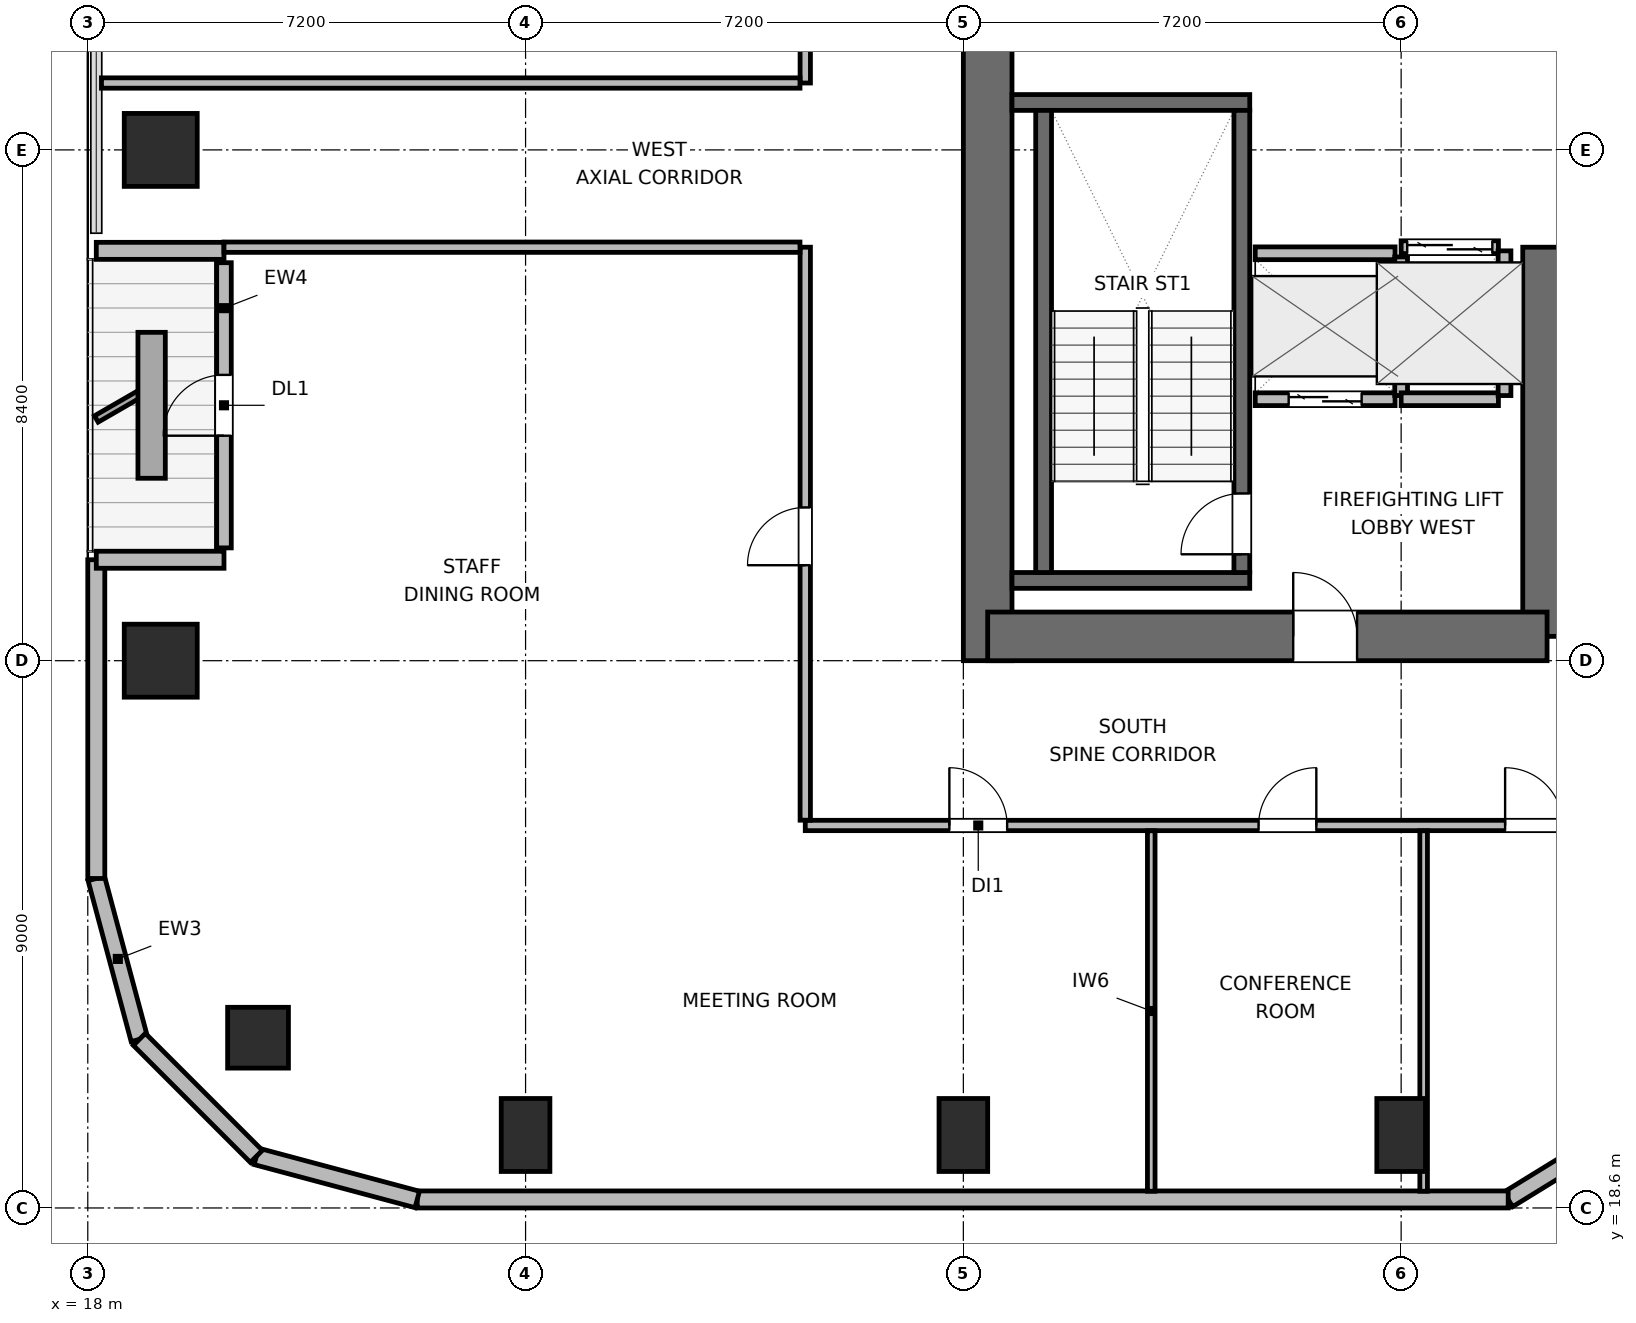
"""IFC4 building model, lengths in metres.
Left out: names, types, materials, properties, quantities, classifications, styles, units other than length and angle.
Written with IfcOpenShell. Run it as: python <this file> out.ifc"""

import sys

from ifc_helpers import new_model, si_unit, direction, frame, frame_2d, origin, origin_2d, place, context, subcontext, project, spatial, rectangle, circle, extrude, element, fill, save


model = new_model("IFC4")
c1 = context("Model", 3, precision=1e-05, world=origin(), true_north=direction((0.0, 1.0)))
c2 = subcontext(c1, "Body", "Model", "MODEL_VIEW")
j1 = project(units=[si_unit("LENGTHUNIT", "METRE"), si_unit("PLANEANGLEUNIT", "RADIAN")], contexts=[c1])
p1 = place(None, origin())
s1 = spatial("IfcSite", under=j1, at=p1, CompositionType="ELEMENT")
p2 = place(p1, origin())
s2 = spatial("IfcBuilding", under=s1, at=p2, CompositionType="ELEMENT")
p3 = place(p2, frame((0.0, 0.0, 166.2)))
s3 = spatial("IfcBuildingStorey", under=s2, at=p3, CompositionType="ELEMENT", Elevation=166.2)
p4 = place(p3, frame((32.8, 27.6, 0.0), z_axis=(0.0, 0.0, 1.0), x_axis=(0.0, 1.0, 0.0)))
e1 = element("IfcWall", 1, at=p4, inside=s3, PredefinedType="SHEAR", context=c2, shape_type="SweptSolid", body=[
    extrude(rectangle(XDim=16.8, YDim=0.8, at=frame_2d((8.4, 0.0))), origin(), (0.0, 0.0, 1.0), 3.9),
])
p5 = place(p3, frame((42.0, 28.0, 0.0), z_axis=(0.0, 0.0, 1.0), x_axis=(0.0, 1.0, 0.0)))
e2 = element("IfcWall", 2, at=p5, inside=s3, PredefinedType="SHEAR", context=c2, shape_type="SweptSolid", body=[
    extrude(rectangle(XDim=6.4, YDim=0.8, at=frame_2d((3.2, 0.0))), origin(), (0.0, 0.0, 1.0), 3.9),
])
p6 = place(p3, frame((32.8, 28.0, 0.0), z_axis=(0.0, 0.0, 1.0), x_axis=(1.0, 0.0, 0.0)))
e3 = element("IfcWall", 3, at=p6, inside=s3, PredefinedType="SHEAR", context=c2, shape_type="SweptSolid", body=[
    extrude(rectangle(XDim=9.2, YDim=0.8, at=frame_2d((4.6, 0.0))), origin(), (0.0, 0.0, 1.0), 3.9),
])
p7 = place(p6, frame((5.025, 0.0, 0.0)))
e4 = element("IfcOpeningElement", 4, at=p7, cuts=e3, PredefinedType="OPENING", context=c2, shape_type="SweptSolid", body=[
    extrude(rectangle(XDim=1.05, YDim=2.04, at=frame_2d((0.525, 1.02))), frame((0.0, 0.41, 0.0), z_axis=(0.0, -1.0, 0.0), x_axis=(1.0, 0.0, 0.0)), (0.0, 0.0, 1.0), 0.82),
])
for number, where, z_axis, x_axis in (
    (5, (33.2, 28.92, 0.0), (0.0, 0.0, 1.0), (1.0, 0.0, 0.0)),
    (6, (33.2, 36.78, 0.0), (0.0, 0.0, 1.0), (1.0, 0.0, 0.0)),
):
    element("IfcWall", number, at=place(p3, frame(where, z_axis=z_axis, x_axis=x_axis)), inside=s3, PredefinedType="SHEAR", context=c2, shape_type="SweptSolid", body=[
        extrude(rectangle(XDim=3.91, YDim=0.26, at=frame_2d((1.955, 0.0))), origin(), (0.0, 0.0, 1.0), 3.9),
    ])
p8 = place(p3, frame((33.72, 29.05, 0.0), z_axis=(0.0, 0.0, 1.0), x_axis=(0.0, 1.0, 0.0)))
e7 = element("IfcWall", 7, at=p8, inside=s3, PredefinedType="SHEAR", context=c2, shape_type="SweptSolid", body=[
    extrude(rectangle(XDim=7.6, YDim=0.26, at=frame_2d((3.8, 0.0))), origin(), (0.0, 0.0, 1.0), 3.9),
])
p9 = place(p3, frame((36.98, 29.05, 0.0), z_axis=(0.0, 0.0, 1.0), x_axis=(0.0, 1.0, 0.0)))
e8 = element("IfcWall", 8, at=p9, inside=s3, PredefinedType="SHEAR", context=c2, shape_type="SweptSolid", body=[
    extrude(rectangle(XDim=7.6, YDim=0.26, at=frame_2d((3.8, 0.0))), origin(), (0.0, 0.0, 1.0), 3.9),
])
p10 = place(p9, frame((0.3, 0.0, 0.0)))
e9 = element("IfcOpeningElement", 9, at=p10, cuts=e8, PredefinedType="OPENING", context=c2, shape_type="SweptSolid", body=[
    extrude(rectangle(XDim=1.0, YDim=2.04, at=frame_2d((0.5, 1.02))), frame((0.0, 0.14, 0.0), z_axis=(0.0, -1.0, 0.0), x_axis=(1.0, 0.0, 0.0)), (0.0, 0.0, 1.0), 0.28),
])
p11 = place(p3, frame((20.8, 21.4, 0.0), z_axis=(0.0, 0.0, 1.0), x_axis=(1.0, 0.0, 0.0)))
e10 = element("IfcColumn", 10, at=p11, inside=s3, PredefinedType="COLUMN", context=c2, shape_type="SweptSolid", body=[
    extrude(circle(Radius=0.5, at=origin_2d()), origin(), (0.0, 0.0, 1.0), 3.9),
])
for number, where, z_axis, x_axis in (
    (11, (25.2, 19.8, 0.0), (0.0, 0.0, 1.0), (1.0, 0.0, 0.0)),
    (12, (32.4, 19.8, 0.0), (0.0, 0.0, 1.0), (1.0, 0.0, 0.0)),
    (13, (39.6, 19.8, 0.0), (0.0, 0.0, 1.0), (1.0, 0.0, 0.0)),
):
    element("IfcColumn", number, at=place(p3, frame(where, z_axis=z_axis, x_axis=x_axis)), inside=s3, PredefinedType="COLUMN", context=c2, shape_type="SweptSolid", body=[
        extrude(rectangle(XDim=0.8, YDim=1.2, at=origin_2d()), origin(), (0.0, 0.0, 1.0), 3.9),
    ])
for number, where, z_axis, x_axis in (
    (14, (19.2, 27.6, 0.0), (0.0, 0.0, 1.0), (1.0, 0.0, 0.0)),
    (15, (19.2, 36.0, 0.0), (0.0, 0.0, 1.0), (1.0, 0.0, 0.0)),
):
    element("IfcColumn", number, at=place(p3, frame(where, z_axis=z_axis, x_axis=x_axis)), inside=s3, PredefinedType="COLUMN", context=c2, shape_type="SweptSolid", body=[
        extrude(rectangle(XDim=1.2, YDim=1.2, at=origin_2d()), origin(), (0.0, 0.0, 1.0), 3.9),
    ])
p12 = place(p3, frame((18.848, 21.373, 0.0), z_axis=(0.0, 0.0, 1.0), x_axis=(-0.258672222976, 0.9659651552, 0.0)))
e16 = element("IfcWall", 16, at=p12, inside=s3, PredefinedType="SOLIDWALL", context=c2, shape_type="SweptSolid", body=[
    extrude(rectangle(XDim=2.739, YDim=0.28, at=frame_2d((1.37, 0.0))), origin(), (0.0, 0.0, 1.0), 3.68),
])
p13 = place(p3, frame((18.14, 24.018, 0.0), z_axis=(0.0, 0.0, 1.0), x_axis=(0.0, 1.0, 0.0)))
e17 = element("IfcWall", 17, at=p13, inside=s3, PredefinedType="SOLIDWALL", context=c2, shape_type="SweptSolid", body=[
    extrude(rectangle(XDim=5.242, YDim=0.28, at=frame_2d((2.621, 0.0))), origin(), (0.0, 0.0, 1.0), 3.68),
])
p14 = place(p3, frame((18.14, 29.26, 0.0), z_axis=(0.0, 0.0, 1.0), x_axis=(1.0, 0.0, 0.0)))
e18 = element("IfcWall", 18, at=p14, inside=s3, PredefinedType="SOLIDWALL", context=c2, shape_type="SweptSolid", body=[
    extrude(rectangle(XDim=2.1, YDim=0.28, at=frame_2d((1.05, 0.0))), origin(), (0.0, 0.0, 1.0), 3.116),
])
p15 = place(p3, frame((20.24, 29.455, 0.0), z_axis=(0.0, 0.0, 1.0), x_axis=(0.0, 1.0, 0.0)))
e19 = element("IfcWall", 19, at=p15, inside=s3, PredefinedType="SOLIDWALL", context=c2, shape_type="SweptSolid", body=[
    extrude(rectangle(XDim=4.69, YDim=0.24, at=frame_2d((2.345, 0.0))), origin(), (0.0, 0.0, 1.0), 3.248),
])
p16 = place(p15, frame((1.845, 0.0, 0.0)))
e20 = element("IfcOpeningElement", 20, at=p16, cuts=e19, PredefinedType="OPENING", context=c2, shape_type="SweptSolid", body=[
    extrude(rectangle(XDim=1.0, YDim=2.02, at=frame_2d((0.5, 1.01))), frame((0.0, 0.13, 0.0), z_axis=(0.0, -1.0, 0.0), x_axis=(1.0, 0.0, 0.0)), (0.0, 0.0, 1.0), 0.26),
])
p17 = place(p3, frame((20.24, 34.34, 0.0), z_axis=(0.0, 0.0, 1.0), x_axis=(-1.0, 0.0, 0.0)))
e21 = element("IfcWall", 21, at=p17, inside=s3, PredefinedType="SOLIDWALL", context=c2, shape_type="SweptSolid", body=[
    extrude(rectangle(XDim=2.1, YDim=0.28, at=frame_2d((1.05, 0.0))), origin(), (0.0, 0.0, 1.0), 3.116),
])
p18 = place(p3, frame((42.46, 19.416, 0.0), z_axis=(0.0, 0.0, 1.0), x_axis=(-0.851801140441, -0.523865266212, 0.0)))
e22 = element("IfcWall", 22, at=p18, inside=s3, PredefinedType="SOLIDWALL", context=c2, shape_type="SweptSolid", body=[
    extrude(rectangle(XDim=1.291, YDim=0.28, at=frame_2d((0.646, 0.0))), origin(), (0.0, 0.0, 1.0), 3.68),
])
p19 = place(p3, frame((41.36, 18.74, 0.0), z_axis=(0.0, 0.0, 1.0), x_axis=(-1.0, 0.0, 0.0)))
e23 = element("IfcWall", 23, at=p19, inside=s3, PredefinedType="SOLIDWALL", context=c2, shape_type="SweptSolid", body=[
    extrude(rectangle(XDim=17.942, YDim=0.28, at=frame_2d((8.971, 0.0))), origin(), (0.0, 0.0, 1.0), 3.68),
])
p20 = place(p3, frame((23.418, 18.74, 0.0), z_axis=(0.0, 0.0, 1.0), x_axis=(-0.965971118627, 0.258649952598, 0.0)))
e24 = element("IfcWall", 24, at=p20, inside=s3, PredefinedType="SOLIDWALL", context=c2, shape_type="SweptSolid", body=[
    extrude(rectangle(XDim=2.739, YDim=0.28, at=frame_2d((1.37, 0.0))), origin(), (0.0, 0.0, 1.0), 3.68),
])
p21 = place(p3, frame((20.772, 19.448, 0.0), z_axis=(0.0, 0.0, 1.0), x_axis=(-0.707106781187, 0.707106781187, 0.0)))
e25 = element("IfcWall", 25, at=p21, inside=s3, PredefinedType="SOLIDWALL", context=c2, shape_type="SweptSolid", body=[
    extrude(rectangle(XDim=2.721, YDim=0.28, at=frame_2d((1.36, 0.0))), origin(), (0.0, 0.0, 1.0), 3.68),
])
p22 = place(p3, frame((37.2, 31.9, 0.0), z_axis=(0.0, 0.0, 1.0), x_axis=(1.0, 0.0, 0.0)))
e26 = element("IfcWall", 26, at=p22, inside=s3, PredefinedType="PARTITIONING", context=c2, shape_type="SweptSolid", body=[
    extrude(rectangle(XDim=2.3, YDim=0.21, at=frame_2d((1.15, 0.0))), origin(), (0.0, 0.0, 1.0), 3.68),
])
p23 = place(p22, frame((0.55, 0.0, 0.0)))
e27 = element("IfcOpeningElement", 27, at=p23, cuts=e26, PredefinedType="OPENING", context=c2, shape_type="SweptSolid", body=[
    extrude(rectangle(XDim=1.2, YDim=2.04, at=frame_2d((0.6, 1.02))), frame((0.0, 0.115, 0.0), z_axis=(0.0, -1.0, 0.0), x_axis=(1.0, 0.0, 0.0)), (0.0, 0.0, 1.0), 0.23),
])
p24 = place(p3, frame((37.2, 34.3, 0.0), z_axis=(0.0, 0.0, 1.0), x_axis=(1.0, 0.0, 0.0)))
e28 = element("IfcWall", 28, at=p24, inside=s3, PredefinedType="PARTITIONING", context=c2, shape_type="SweptSolid", body=[
    extrude(rectangle(XDim=2.3, YDim=0.21, at=frame_2d((1.15, 0.0))), origin(), (0.0, 0.0, 1.0), 3.68),
])
p25 = place(p3, frame((39.6, 31.96, 0.0), z_axis=(0.0, 0.0, 1.0), x_axis=(0.0, 1.0, 0.0)))
e29 = element("IfcWall", 29, at=p25, inside=s3, PredefinedType="PARTITIONING", context=c2, shape_type="SweptSolid", body=[
    extrude(rectangle(XDim=2.28, YDim=0.21, at=frame_2d((1.14, 0.0))), origin(), (0.0, 0.0, 1.0), 3.68),
])
p26 = place(p3, frame((39.6, 34.4, 0.0), z_axis=(0.0, 0.0, 1.0), x_axis=(1.0, 0.0, 0.0)))
e30 = element("IfcWall", 30, at=p26, inside=s3, PredefinedType="PARTITIONING", context=c2, shape_type="SweptSolid", body=[
    extrude(rectangle(XDim=1.6, YDim=0.21, at=frame_2d((0.8, 0.0))), origin(), (0.0, 0.0, 1.0), 3.68),
])
p27 = place(p26, frame((0.1, 0.0, 0.0)))
e31 = element("IfcOpeningElement", 31, at=p27, cuts=e30, PredefinedType="OPENING", context=c2, shape_type="SweptSolid", body=[
    extrude(rectangle(XDim=1.4, YDim=2.06, at=frame_2d((0.7, 1.03))), frame((0.0, 0.115, 0.0), z_axis=(0.0, -1.0, 0.0), x_axis=(1.0, 0.0, 0.0)), (0.0, 0.0, 1.0), 0.23),
])
p28 = place(p3, frame((39.6, 31.9, 0.0), z_axis=(0.0, 0.0, 1.0), x_axis=(1.0, 0.0, 0.0)))
e32 = element("IfcWall", 32, at=p28, inside=s3, PredefinedType="PARTITIONING", context=c2, shape_type="SweptSolid", body=[
    extrude(rectangle(XDim=1.6, YDim=0.21, at=frame_2d((0.8, 0.0))), origin(), (0.0, 0.0, 1.0), 3.68),
])
p29 = place(p3, frame((41.3, 31.96, 0.0), z_axis=(0.0, 0.0, 1.0), x_axis=(0.0, 1.0, 0.0)))
e33 = element("IfcWall", 33, at=p29, inside=s3, PredefinedType="PARTITIONING", context=c2, shape_type="SweptSolid", body=[
    extrude(rectangle(XDim=2.38, YDim=0.21, at=frame_2d((1.19, 0.0))), origin(), (0.0, 0.0, 1.0), 3.68),
])
p30 = place(p3, frame((29.8, 24.89, 0.0), z_axis=(0.0, 0.0, 1.0), x_axis=(1.0, 0.0, 0.0)))
e34 = element("IfcWall", 34, at=p30, inside=s3, PredefinedType="PARTITIONING", context=c2, shape_type="SweptSolid", body=[
    extrude(rectangle(XDim=33.8, YDim=0.17, at=frame_2d((16.9, 0.0))), origin(), (0.0, 0.0, 1.0), 3.68),
])
p31 = place(p30, frame((2.37, 0.0, 0.0)))
e35 = element("IfcOpeningElement", 35, at=p31, cuts=e34, PredefinedType="OPENING", context=c2, shape_type="SweptSolid", body=[
    extrude(rectangle(XDim=0.95, YDim=2.04, at=frame_2d((0.475, 1.02))), frame((0.0, 0.095, 0.0), z_axis=(0.0, -1.0, 0.0), x_axis=(1.0, 0.0, 0.0)), (0.0, 0.0, 1.0), 0.19),
])
p32 = place(p30, frame((7.455, 0.0, 0.0)))
e36 = element("IfcOpeningElement", 36, at=p32, cuts=e34, PredefinedType="OPENING", context=c2, shape_type="SweptSolid", body=[
    extrude(rectangle(XDim=0.95, YDim=2.04, at=frame_2d((0.475, 1.02))), frame((0.0, 0.095, 0.0), z_axis=(0.0, -1.0, 0.0), x_axis=(1.0, 0.0, 0.0)), (0.0, 0.0, 1.0), 0.19),
])
p33 = place(p30, frame((11.51, 0.0, 0.0)))
e37 = element("IfcOpeningElement", 37, at=p33, cuts=e34, PredefinedType="OPENING", context=c2, shape_type="SweptSolid", body=[
    extrude(rectangle(XDim=0.95, YDim=2.04, at=frame_2d((0.475, 1.02))), frame((0.0, 0.095, 0.0), z_axis=(0.0, -1.0, 0.0), x_axis=(1.0, 0.0, 0.0)), (0.0, 0.0, 1.0), 0.19),
])
p34 = place(p30, frame((15.995, 0.0, 0.0)))
e38 = element("IfcOpeningElement", 38, at=p34, cuts=e34, PredefinedType="OPENING", context=c2, shape_type="SweptSolid", body=[
    extrude(rectangle(XDim=0.95, YDim=2.04, at=frame_2d((0.475, 1.02))), frame((0.0, 0.095, 0.0), z_axis=(0.0, -1.0, 0.0), x_axis=(1.0, 0.0, 0.0)), (0.0, 0.0, 1.0), 0.19),
])
p35 = place(p30, frame((20.91, 0.0, 0.0)))
e39 = element("IfcOpeningElement", 39, at=p35, cuts=e34, PredefinedType="OPENING", context=c2, shape_type="SweptSolid", body=[
    extrude(rectangle(XDim=0.95, YDim=2.04, at=frame_2d((0.475, 1.02))), frame((0.0, 0.095, 0.0), z_axis=(0.0, -1.0, 0.0), x_axis=(1.0, 0.0, 0.0)), (0.0, 0.0, 1.0), 0.19),
])
p36 = place(p30, frame((25.395, 0.0, 0.0)))
e40 = element("IfcOpeningElement", 40, at=p36, cuts=e34, PredefinedType="OPENING", context=c2, shape_type="SweptSolid", body=[
    extrude(rectangle(XDim=0.95, YDim=2.04, at=frame_2d((0.475, 1.02))), frame((0.0, 0.095, 0.0), z_axis=(0.0, -1.0, 0.0), x_axis=(1.0, 0.0, 0.0)), (0.0, 0.0, 1.0), 0.19),
])
p37 = place(p30, frame((30.48, 0.0, 0.0)))
e41 = element("IfcOpeningElement", 41, at=p37, cuts=e34, PredefinedType="OPENING", context=c2, shape_type="SweptSolid", body=[
    extrude(rectangle(XDim=0.95, YDim=2.04, at=frame_2d((0.475, 1.02))), frame((0.0, 0.095, 0.0), z_axis=(0.0, -1.0, 0.0), x_axis=(1.0, 0.0, 0.0)), (0.0, 0.0, 1.0), 0.19),
])
p38 = place(p3, frame((29.8, 24.977, 0.0), z_axis=(0.0, 0.0, 1.0), x_axis=(0.0, 1.0, 0.0)))
e42 = element("IfcWall", 42, at=p38, inside=s3, PredefinedType="PARTITIONING", context=c2, shape_type="SweptSolid", body=[
    extrude(rectangle(XDim=9.423, YDim=0.17, at=frame_2d((4.711, 0.0))), origin(), (0.0, 0.0, 1.0), 3.68),
])
p39 = place(p38, frame((4.193, 0.0, 0.0)))
e43 = element("IfcOpeningElement", 43, at=p39, cuts=e42, PredefinedType="OPENING", context=c2, shape_type="SweptSolid", body=[
    extrude(rectangle(XDim=0.95, YDim=2.04, at=frame_2d((0.475, 1.02))), frame((0.0, 0.095, 0.0), z_axis=(0.0, -1.0, 0.0), x_axis=(1.0, 0.0, 0.0)), (0.0, 0.0, 1.0), 0.19),
])
p40 = place(p3, frame((29.8, 37.1, 0.0), z_axis=(0.0, 0.0, 1.0), x_axis=(0.0, 1.0, 0.0)))
e44 = element("IfcWall", 44, at=p40, inside=s3, PredefinedType="PARTITIONING", context=c2, shape_type="SweptSolid", body=[
    extrude(rectangle(XDim=9.923, YDim=0.17, at=frame_2d((4.961, 0.0))), origin(), (0.0, 0.0, 1.0), 3.68),
])
p41 = place(p40, frame((4.53, 0.0, 0.0)))
e45 = element("IfcOpeningElement", 45, at=p41, cuts=e44, PredefinedType="OPENING", context=c2, shape_type="SweptSolid", body=[
    extrude(rectangle(XDim=0.95, YDim=2.04, at=frame_2d((0.475, 1.02))), frame((0.0, 0.095, 0.0), z_axis=(0.0, -1.0, 0.0), x_axis=(1.0, 0.0, 0.0)), (0.0, 0.0, 1.0), 0.19),
])
p42 = place(p3, frame((35.49, 18.875, 0.0), z_axis=(0.0, 0.0, 1.0), x_axis=(0.0, 1.0, 0.0)))
e46 = element("IfcWall", 46, at=p42, inside=s3, PredefinedType="PARTITIONING", context=c2, shape_type="SweptSolid", body=[
    extrude(rectangle(XDim=5.928, YDim=0.125, at=frame_2d((2.964, 0.0))), origin(), (0.0, 0.0, 1.0), 3.68),
])
p43 = place(p3, frame((39.97, 18.875, 0.0), z_axis=(0.0, 0.0, 1.0), x_axis=(0.0, 1.0, 0.0)))
e47 = element("IfcWall", 47, at=p43, inside=s3, PredefinedType="PARTITIONING", context=c2, shape_type="SweptSolid", body=[
    extrude(rectangle(XDim=5.928, YDim=0.125, at=frame_2d((2.964, 0.0))), origin(), (0.0, 0.0, 1.0), 3.043),
])
p44 = place(p3, frame((20.24, 34.4, 0.0), z_axis=(0.0, 0.0, 1.0), x_axis=(1.0, 0.0, 0.0)))
e48 = element("IfcWall", 48, at=p44, inside=s3, PredefinedType="PARTITIONING", context=c2, shape_type="SweptSolid", body=[
    extrude(rectangle(XDim=9.473, YDim=0.17, at=frame_2d((4.736, 0.0))), origin(), (0.0, 0.0, 1.0), 3.68),
])
p45 = place(p3, frame((18.225, 37.1, 0.0), z_axis=(0.0, 0.0, 1.0), x_axis=(1.0, 0.0, 0.0)))
e49 = element("IfcWall", 49, at=p45, inside=s3, PredefinedType="PARTITIONING", context=c2, shape_type="SweptSolid", body=[
    extrude(rectangle(XDim=11.488, YDim=0.17, at=frame_2d((5.744, 0.0))), origin(), (0.0, 0.0, 1.0), 3.68),
])
p46 = place(p16, origin())
e50 = element("IfcDoor", 50, at=p46, inside=s3, OperationType="SINGLE_SWING_LEFT", PredefinedType="DOOR", context=c2, shape_type="SweptSolid", body=[
    extrude(rectangle(XDim=1.0, YDim=2.02, at=frame_2d((0.5, 1.01))), frame((0.0, 0.025, 0.0), z_axis=(0.0, -1.0, 0.0), x_axis=(1.0, 0.0, 0.0)), (0.0, 0.0, 1.0), 0.05),
])
fill(e20, e50)
p47 = place(p10, origin())
e51 = element("IfcDoor", 51, at=p47, inside=s3, OperationType="SINGLE_SWING_LEFT", PredefinedType="DOOR", context=c2, shape_type="SweptSolid", body=[
    extrude(rectangle(XDim=1.0, YDim=2.04, at=frame_2d((0.5, 1.02))), frame((0.0, 0.025, 0.0), z_axis=(0.0, -1.0, 0.0), x_axis=(1.0, 0.0, 0.0)), (0.0, 0.0, 1.0), 0.05),
])
fill(e9, e51)
p48 = place(p23, origin())
e52 = element("IfcDoor", 52, at=p48, inside=s3, OperationType="DOUBLE_DOOR_SLIDING", PredefinedType="DOOR", context=c2, shape_type="SweptSolid", body=[
    extrude(rectangle(XDim=1.2, YDim=2.04, at=frame_2d((0.6, 1.02))), frame((0.0, 0.025, 0.0), z_axis=(0.0, -1.0, 0.0), x_axis=(1.0, 0.0, 0.0)), (0.0, 0.0, 1.0), 0.05),
])
fill(e27, e52)
p49 = place(p27, origin())
e53 = element("IfcDoor", 53, at=p49, inside=s3, OperationType="DOUBLE_DOOR_SLIDING", PredefinedType="DOOR", context=c2, shape_type="SweptSolid", body=[
    extrude(rectangle(XDim=1.4, YDim=2.06, at=frame_2d((0.7, 1.03))), frame((0.0, 0.025, 0.0), z_axis=(0.0, -1.0, 0.0), x_axis=(1.0, 0.0, 0.0)), (0.0, 0.0, 1.0), 0.05),
])
fill(e31, e53)
p50 = place(p7, origin())
e54 = element("IfcDoor", 54, at=p50, inside=s3, OperationType="SINGLE_SWING_LEFT", PredefinedType="DOOR", context=c2, shape_type="SweptSolid", body=[
    extrude(rectangle(XDim=1.05, YDim=2.04, at=frame_2d((0.525, 1.02))), frame((0.0, 0.025, 0.0), z_axis=(0.0, -1.0, 0.0), x_axis=(1.0, 0.0, 0.0)), (0.0, 0.0, 1.0), 0.05),
])
fill(e4, e54)
p51 = place(p31, origin())
e55 = element("IfcDoor", 55, at=p51, inside=s3, OperationType="SINGLE_SWING_LEFT", PredefinedType="DOOR", context=c2, shape_type="SweptSolid", body=[
    extrude(rectangle(XDim=0.95, YDim=2.04, at=frame_2d((0.475, 1.02))), frame((0.0, 0.025, 0.0), z_axis=(0.0, -1.0, 0.0), x_axis=(1.0, 0.0, 0.0)), (0.0, 0.0, 1.0), 0.05),
])
fill(e35, e55)
p52 = place(p32, origin())
e56 = element("IfcDoor", 56, at=p52, inside=s3, OperationType="SINGLE_SWING_RIGHT", PredefinedType="DOOR", context=c2, shape_type="SweptSolid", body=[
    extrude(rectangle(XDim=0.95, YDim=2.04, at=frame_2d((0.475, 1.02))), frame((0.0, 0.025, 0.0), z_axis=(0.0, -1.0, 0.0), x_axis=(1.0, 0.0, 0.0)), (0.0, 0.0, 1.0), 0.05),
])
fill(e36, e56)
p53 = place(p33, origin())
e57 = element("IfcDoor", 57, at=p53, inside=s3, OperationType="SINGLE_SWING_LEFT", PredefinedType="DOOR", context=c2, shape_type="SweptSolid", body=[
    extrude(rectangle(XDim=0.95, YDim=2.04, at=frame_2d((0.475, 1.02))), frame((0.0, 0.025, 0.0), z_axis=(0.0, -1.0, 0.0), x_axis=(1.0, 0.0, 0.0)), (0.0, 0.0, 1.0), 0.05),
])
fill(e37, e57)
p54 = place(p39, origin())
e58 = element("IfcDoor", 58, at=p54, inside=s3, OperationType="SINGLE_SWING_LEFT", PredefinedType="DOOR", context=c2, shape_type="SweptSolid", body=[
    extrude(rectangle(XDim=0.95, YDim=2.04, at=frame_2d((0.475, 1.02))), frame((0.0, 0.025, 0.0), z_axis=(0.0, -1.0, 0.0), x_axis=(1.0, 0.0, 0.0)), (0.0, 0.0, 1.0), 0.05),
])
fill(e43, e58)
save(model, sys.argv[1])
